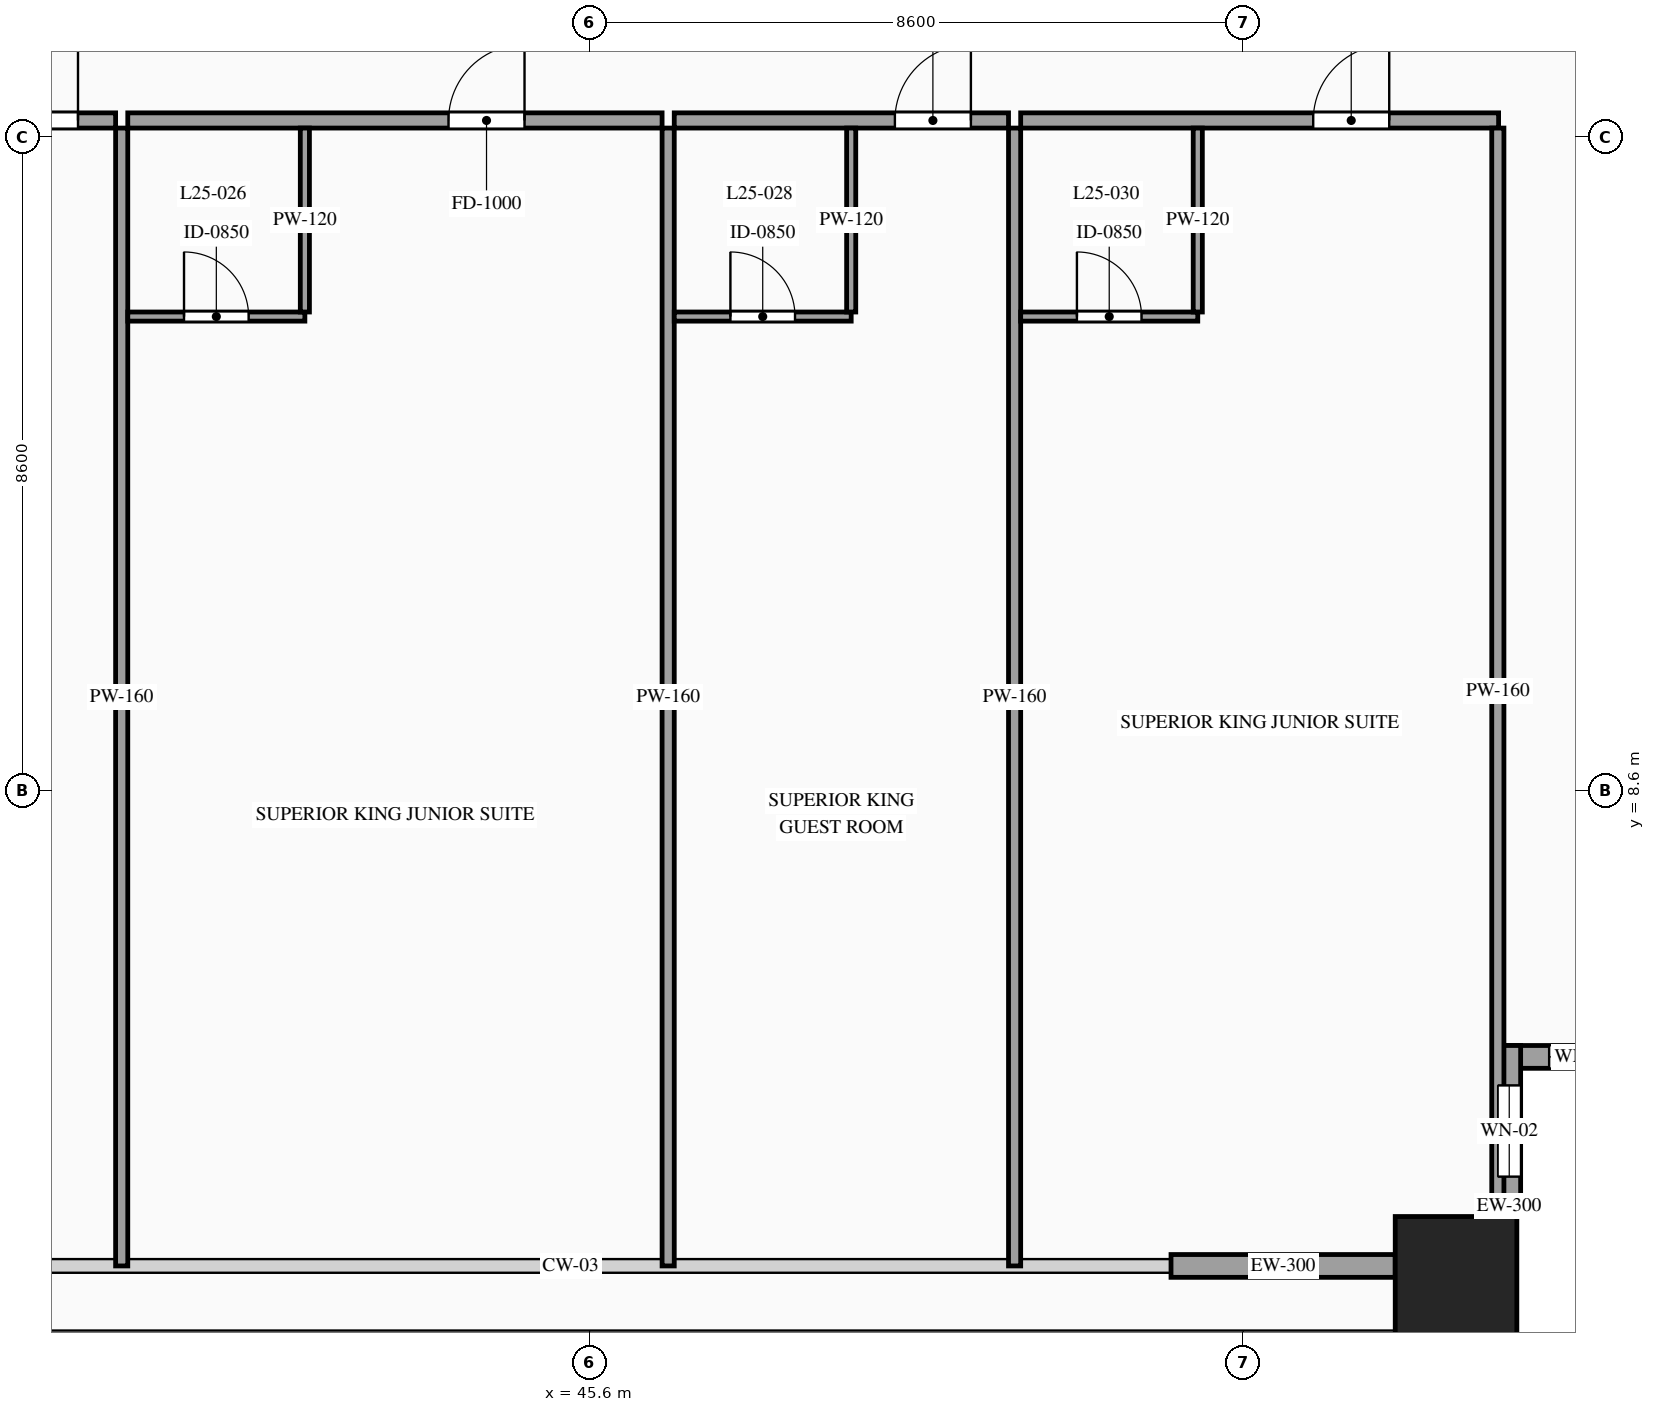
"""IFC4 building model, lengths in metres.
Left out: names, types, materials, properties, quantities, classifications, styles, units other than length and angle.
Written with IfcOpenShell. Run it as: python <this file> out.ifc"""

import sys

from ifc_helpers import new_model, si_unit, direction, frame, frame_2d, origin, origin_2d, place, context, subcontext, project, spatial, rectangle, hollow_rectangle, extrude, source, transform, mapped, element, fill, save


model = new_model("IFC4")
c1 = context("Model", 3, precision=1e-05, world=origin(), true_north=direction((0.0, 1.0)))
c2 = subcontext(c1, "Body", "Model", "MODEL_VIEW")
j1 = project(units=[si_unit("LENGTHUNIT", "METRE"), si_unit("PLANEANGLEUNIT", "RADIAN")], contexts=[c1])
p1 = place(None, origin())
s1 = spatial("IfcSite", under=j1, at=p1, CompositionType="ELEMENT")
p2 = place(p1, origin())
s2 = spatial("IfcBuilding", under=s1, at=p2, CompositionType="ELEMENT")
p3 = place(p2, frame((0.0, 0.0, 97.4)))
s3 = spatial("IfcBuildingStorey", under=s2, at=p3, CompositionType="ELEMENT", Elevation=97.4)
m1 = source(origin(), c2, "Body", "SweptSolid", [
    extrude(hollow_rectangle(XDim=1.6, YDim=1.6, WallThickness=0.07, at=origin_2d()), origin(), (0.0, 0.0, 1.0), 3.6),
])
p4 = place(p3, frame((57.0, 2.2, 0.0), z_axis=(0.0, 0.0, 1.0), x_axis=(1.0, 0.0, 0.0)))
e1 = element("IfcColumn", 1, at=p4, inside=s3, PredefinedType="COLUMN", context=c2, shape_type="MappedRepresentation", body=[
    mapped(m1, transform((0.0, 0.0, 0.0), scale=1.0)),
])
p5 = place(p3, frame((57.55, 5.1, 0.0), z_axis=(0.0, 0.0, 1.0), x_axis=(1.0, 0.0, 0.0)))
e2 = element("IfcWall", 2, at=p5, inside=s3, PredefinedType="SOLIDWALL", context=c2, shape_type="SweptSolid", body=[
    extrude(rectangle(XDim=2.25, YDim=0.3, at=frame_2d((1.125, 0.0))), origin(), (0.0, 0.0, 1.0), 3.38),
])
p6 = place(p5, frame((0.675, 0.0, 0.85)))
e3 = element("IfcOpeningElement", 3, at=p6, cuts=e2, PredefinedType="OPENING", context=c2, shape_type="SweptSolid", body=[
    extrude(rectangle(XDim=0.9, YDim=1.5, at=frame_2d((0.45, 0.75))), frame((0.0, 0.165, 0.0), z_axis=(0.0, -1.0, 0.0), x_axis=(1.0, 0.0, 0.0)), (0.0, 0.0, 1.0), 0.33),
])
p7 = place(p3, frame((57.7, 3.0, 0.0), z_axis=(0.0, 0.0, 1.0), x_axis=(0.0, 1.0, 0.0)))
e4 = element("IfcWall", 4, at=p7, inside=s3, PredefinedType="SOLIDWALL", context=c2, shape_type="SweptSolid", body=[
    extrude(rectangle(XDim=2.25, YDim=0.3, at=frame_2d((1.125, 0.0))), origin(), (0.0, 0.0, 1.0), 3.38),
])
p8 = place(p7, frame((0.525, 0.0, 0.85)))
e5 = element("IfcOpeningElement", 5, at=p8, cuts=e4, PredefinedType="OPENING", context=c2, shape_type="SweptSolid", body=[
    extrude(rectangle(XDim=1.2, YDim=2.1, at=frame_2d((0.6, 1.05))), frame((0.0, 0.165, 0.0), z_axis=(0.0, -1.0, 0.0), x_axis=(1.0, 0.0, 0.0)), (0.0, 0.0, 1.0), 0.33),
])
m2 = source(origin(), c2, "Body", "SweptSolid", [
    extrude(rectangle(XDim=2.95, YDim=0.3, at=frame_2d((1.475, 0.0))), origin(), (0.0, 0.0, 1.0), 2.775),
])
p9 = place(p3, frame((53.25, 2.35, 0.0), z_axis=(0.0, 0.0, 1.0), x_axis=(1.0, 0.0, 0.0)))
e6 = element("IfcWall", 6, at=p9, inside=s3, PredefinedType="SOLIDWALL", context=c2, shape_type="MappedRepresentation", body=[
    mapped(m2, transform((0.0, 0.0, 0.0), scale=1.0)),
])
p10 = place(p3, frame((34.965, 17.42, 0.0), z_axis=(0.0, 0.0, 1.0), x_axis=(1.0, 0.0, 0.0)))
e7 = element("IfcWall", 7, at=p10, inside=s3, PredefinedType="PARTITIONING", context=c2, shape_type="SweptSolid", body=[
    extrude(rectangle(XDim=4.399, YDim=0.2, at=frame_2d((2.199, 0.0))), origin(), (0.0, 0.0, 1.0), 3.38),
])
p11 = place(p10, frame((2.904, 0.0, 0.0)))
e8 = element("IfcOpeningElement", 8, at=p11, cuts=e7, PredefinedType="OPENING", context=c2, shape_type="SweptSolid", body=[
    extrude(rectangle(XDim=1.0, YDim=2.2, at=frame_2d((0.5, 1.1))), frame((0.0, 0.115, 0.0), z_axis=(0.0, -1.0, 0.0), x_axis=(1.0, 0.0, 0.0)), (0.0, 0.0, 1.0), 0.23),
])
m3 = source(origin(), c2, "Body", "SweptSolid", [
    extrude(rectangle(XDim=14.97, YDim=0.16, at=frame_2d((7.485, 0.0))), origin(), (0.0, 0.0, 1.0), 3.38),
])
p12 = place(p3, frame((39.444, 2.35, 0.0), z_axis=(0.0, 0.0, 1.0), x_axis=(0.0, 1.0, 0.0)))
e9 = element("IfcWall", 9, at=p12, inside=s3, PredefinedType="PARTITIONING", context=c2, shape_type="MappedRepresentation", body=[
    mapped(m3, transform((0.0, 0.0, 0.0), scale=1.0)),
])
p13 = place(p3, frame((39.524, 17.42, 0.0), z_axis=(0.0, 0.0, 1.0), x_axis=(1.0, 0.0, 0.0)))
e10 = element("IfcWall", 10, at=p13, inside=s3, PredefinedType="PARTITIONING", context=c2, shape_type="SweptSolid", body=[
    extrude(rectangle(XDim=7.03, YDim=0.2, at=frame_2d((3.515, 0.0))), origin(), (0.0, 0.0, 1.0), 3.38),
])
p14 = place(p13, frame((4.22, 0.0, 0.0)))
e11 = element("IfcOpeningElement", 11, at=p14, cuts=e10, PredefinedType="OPENING", context=c2, shape_type="SweptSolid", body=[
    extrude(rectangle(XDim=1.0, YDim=2.2, at=frame_2d((0.5, 1.1))), frame((0.0, 0.115, 0.0), z_axis=(0.0, -1.0, 0.0), x_axis=(1.0, 0.0, 0.0)), (0.0, 0.0, 1.0), 0.23),
])
p15 = place(p3, frame((46.634, 2.35, 0.0), z_axis=(0.0, 0.0, 1.0), x_axis=(0.0, 1.0, 0.0)))
e12 = element("IfcWall", 12, at=p15, inside=s3, PredefinedType="PARTITIONING", context=c2, shape_type="MappedRepresentation", body=[
    mapped(m3, transform((0.0, 0.0, 0.0), scale=1.0)),
])
p16 = place(p3, frame((39.524, 14.84, 0.0), z_axis=(0.0, 0.0, 1.0), x_axis=(1.0, 0.0, 0.0)))
e13 = element("IfcWall", 13, at=p16, inside=s3, PredefinedType="PARTITIONING", context=c2, shape_type="SweptSolid", body=[
    extrude(rectangle(XDim=2.33, YDim=0.12, at=frame_2d((1.165, 0.0))), origin(), (0.0, 0.0, 1.0), 3.38),
])
p17 = place(p16, frame((0.74, 0.0, 0.0)))
e14 = element("IfcOpeningElement", 14, at=p17, cuts=e13, PredefinedType="OPENING", context=c2, shape_type="SweptSolid", body=[
    extrude(rectangle(XDim=0.85, YDim=2.1, at=frame_2d((0.425, 1.05))), frame((0.0, 0.075, 0.0), z_axis=(0.0, -1.0, 0.0), x_axis=(1.0, 0.0, 0.0)), (0.0, 0.0, 1.0), 0.15),
])
m4 = source(origin(), c2, "Body", "SweptSolid", [
    extrude(rectangle(XDim=2.42, YDim=0.12, at=frame_2d((1.21, 0.0))), origin(), (0.0, 0.0, 1.0), 3.38),
])
p18 = place(p3, frame((41.854, 14.9, 0.0), z_axis=(0.0, 0.0, 1.0), x_axis=(0.0, 1.0, 0.0)))
e15 = element("IfcWall", 15, at=p18, inside=s3, PredefinedType="PARTITIONING", context=c2, shape_type="MappedRepresentation", body=[
    mapped(m4, transform((0.0, 0.0, 0.0), scale=1.0)),
])
p19 = place(p3, frame((46.714, 17.42, 0.0), z_axis=(0.0, 0.0, 1.0), x_axis=(1.0, 0.0, 0.0)))
e16 = element("IfcWall", 16, at=p19, inside=s3, PredefinedType="PARTITIONING", context=c2, shape_type="SweptSolid", body=[
    extrude(rectangle(XDim=4.398, YDim=0.2, at=frame_2d((2.199, 0.0))), origin(), (0.0, 0.0, 1.0), 3.38),
])
p20 = place(p19, frame((2.903, 0.0, 0.0)))
e17 = element("IfcOpeningElement", 17, at=p20, cuts=e16, PredefinedType="OPENING", context=c2, shape_type="SweptSolid", body=[
    extrude(rectangle(XDim=1.0, YDim=2.2, at=frame_2d((0.5, 1.1))), frame((0.0, 0.115, 0.0), z_axis=(0.0, -1.0, 0.0), x_axis=(1.0, 0.0, 0.0)), (0.0, 0.0, 1.0), 0.23),
])
p21 = place(p3, frame((51.192, 2.35, 0.0), z_axis=(0.0, 0.0, 1.0), x_axis=(0.0, 1.0, 0.0)))
e18 = element("IfcWall", 18, at=p21, inside=s3, PredefinedType="PARTITIONING", context=c2, shape_type="MappedRepresentation", body=[
    mapped(m3, transform((0.0, 0.0, 0.0), scale=1.0)),
])
p22 = place(p3, frame((46.714, 14.84, 0.0), z_axis=(0.0, 0.0, 1.0), x_axis=(1.0, 0.0, 0.0)))
e19 = element("IfcWall", 19, at=p22, inside=s3, PredefinedType="PARTITIONING", context=c2, shape_type="SweptSolid", body=[
    extrude(rectangle(XDim=2.328, YDim=0.12, at=frame_2d((1.164, 0.0))), origin(), (0.0, 0.0, 1.0), 3.38),
])
p23 = place(p22, frame((0.739, 0.0, 0.0)))
e20 = element("IfcOpeningElement", 20, at=p23, cuts=e19, PredefinedType="OPENING", context=c2, shape_type="SweptSolid", body=[
    extrude(rectangle(XDim=0.85, YDim=2.1, at=frame_2d((0.425, 1.05))), frame((0.0, 0.075, 0.0), z_axis=(0.0, -1.0, 0.0), x_axis=(1.0, 0.0, 0.0)), (0.0, 0.0, 1.0), 0.15),
])
p24 = place(p3, frame((49.042, 14.9, 0.0), z_axis=(0.0, 0.0, 1.0), x_axis=(0.0, 1.0, 0.0)))
e21 = element("IfcWall", 21, at=p24, inside=s3, PredefinedType="PARTITIONING", context=c2, shape_type="MappedRepresentation", body=[
    mapped(m4, transform((0.0, 0.0, 0.0), scale=1.0)),
])
p25 = place(p3, frame((51.272, 17.42, 0.0), z_axis=(0.0, 0.0, 1.0), x_axis=(1.0, 0.0, 0.0)))
e22 = element("IfcWall", 22, at=p25, inside=s3, PredefinedType="PARTITIONING", context=c2, shape_type="SweptSolid", body=[
    extrude(rectangle(XDim=6.288, YDim=0.2, at=frame_2d((3.144, 0.0))), origin(), (0.0, 0.0, 1.0), 3.38),
])
p26 = place(p25, frame((3.849, 0.0, 0.0)))
e23 = element("IfcOpeningElement", 23, at=p26, cuts=e22, PredefinedType="OPENING", context=c2, shape_type="SweptSolid", body=[
    extrude(rectangle(XDim=1.0, YDim=2.2, at=frame_2d((0.5, 1.1))), frame((0.0, 0.115, 0.0), z_axis=(0.0, -1.0, 0.0), x_axis=(1.0, 0.0, 0.0)), (0.0, 0.0, 1.0), 0.23),
])
m5 = source(origin(), c2, "Body", "SweptSolid", [
    extrude(rectangle(XDim=14.82, YDim=0.16, at=frame_2d((7.41, 0.0))), origin(), (0.0, 0.0, 1.0), 3.38),
])
p27 = place(p3, frame((57.55, 2.5, 0.0), z_axis=(0.0, 0.0, 1.0), x_axis=(0.0, 1.0, 0.0)))
e24 = element("IfcWall", 24, at=p27, inside=s3, PredefinedType="PARTITIONING", context=c2, shape_type="MappedRepresentation", body=[
    mapped(m5, transform((0.0, 0.0, 0.0), scale=1.0)),
])
p28 = place(p3, frame((51.272, 14.84, 0.0), z_axis=(0.0, 0.0, 1.0), x_axis=(1.0, 0.0, 0.0)))
e25 = element("IfcWall", 25, at=p28, inside=s3, PredefinedType="PARTITIONING", context=c2, shape_type="SweptSolid", body=[
    extrude(rectangle(XDim=2.33, YDim=0.12, at=frame_2d((1.165, 0.0))), origin(), (0.0, 0.0, 1.0), 3.38),
])
p29 = place(p28, frame((0.74, 0.0, 0.0)))
e26 = element("IfcOpeningElement", 26, at=p29, cuts=e25, PredefinedType="OPENING", context=c2, shape_type="SweptSolid", body=[
    extrude(rectangle(XDim=0.85, YDim=2.1, at=frame_2d((0.425, 1.05))), frame((0.0, 0.075, 0.0), z_axis=(0.0, -1.0, 0.0), x_axis=(1.0, 0.0, 0.0)), (0.0, 0.0, 1.0), 0.15),
])
p30 = place(p3, frame((53.602, 14.9, 0.0), z_axis=(0.0, 0.0, 1.0), x_axis=(0.0, 1.0, 0.0)))
e27 = element("IfcWall", 27, at=p30, inside=s3, PredefinedType="PARTITIONING", context=c2, shape_type="MappedRepresentation", body=[
    mapped(m4, transform((0.0, 0.0, 0.0), scale=1.0)),
])
m6 = source(origin(), c2, "Body", "SweptSolid", [
    extrude(rectangle(XDim=0.9, YDim=1.5, at=frame_2d((0.45, 0.75))), frame((0.0, 0.03, 0.0), z_axis=(0.0, -1.0, 0.0), x_axis=(1.0, 0.0, 0.0)), (0.0, 0.0, 1.0), 0.06),
])
p31 = place(p6, origin())
e28 = element("IfcWindow", 28, at=p31, inside=s3, PartitioningType="SINGLE_PANEL", PredefinedType="WINDOW", context=c2, shape_type="MappedRepresentation", body=[
    mapped(m6, transform((0.0, 0.0, 0.0), scale=1.0)),
])
fill(e3, e28)
m7 = source(origin(), c2, "Body", "SweptSolid", [
    extrude(rectangle(XDim=1.2, YDim=2.1, at=frame_2d((0.6, 1.05))), frame((0.0, 0.03, 0.0), z_axis=(0.0, -1.0, 0.0), x_axis=(1.0, 0.0, 0.0)), (0.0, 0.0, 1.0), 0.06),
])
p32 = place(p8, origin())
e29 = element("IfcWindow", 29, at=p32, inside=s3, PartitioningType="SINGLE_PANEL", PredefinedType="WINDOW", context=c2, shape_type="MappedRepresentation", body=[
    mapped(m7, transform((0.0, 0.0, 0.0), scale=1.0)),
])
fill(e5, e29)
m8 = source(origin(), c2, "Body", "SweptSolid", [
    extrude(rectangle(XDim=1.0, YDim=2.2, at=frame_2d((0.5, 1.1))), frame((0.0, 0.025, 0.0), z_axis=(0.0, -1.0, 0.0), x_axis=(1.0, 0.0, 0.0)), (0.0, 0.0, 1.0), 0.05),
])
p33 = place(p11, origin())
e30 = element("IfcDoor", 30, at=p33, inside=s3, OperationType="SINGLE_SWING_RIGHT", PredefinedType="DOOR", context=c2, shape_type="MappedRepresentation", body=[
    mapped(m8, transform((0.0, 0.0, 0.0), scale=1.0)),
])
fill(e8, e30)
p34 = place(p14, origin())
e31 = element("IfcDoor", 31, at=p34, inside=s3, OperationType="SINGLE_SWING_RIGHT", PredefinedType="DOOR", context=c2, shape_type="MappedRepresentation", body=[
    mapped(m8, transform((0.0, 0.0, 0.0), scale=1.0)),
])
fill(e11, e31)
m9 = source(origin(), c2, "Body", "SweptSolid", [
    extrude(rectangle(XDim=0.85, YDim=2.1, at=frame_2d((0.425, 1.05))), frame((0.0, 0.025, 0.0), z_axis=(0.0, -1.0, 0.0), x_axis=(1.0, 0.0, 0.0)), (0.0, 0.0, 1.0), 0.05),
])
p35 = place(p17, origin())
e32 = element("IfcDoor", 32, at=p35, inside=s3, OperationType="SINGLE_SWING_LEFT", PredefinedType="DOOR", context=c2, shape_type="MappedRepresentation", body=[
    mapped(m9, transform((0.0, 0.0, 0.0), scale=1.0)),
])
fill(e14, e32)
p36 = place(p20, origin())
e33 = element("IfcDoor", 33, at=p36, inside=s3, OperationType="SINGLE_SWING_RIGHT", PredefinedType="DOOR", context=c2, shape_type="MappedRepresentation", body=[
    mapped(m8, transform((0.0, 0.0, 0.0), scale=1.0)),
])
fill(e17, e33)
p37 = place(p23, origin())
e34 = element("IfcDoor", 34, at=p37, inside=s3, OperationType="SINGLE_SWING_LEFT", PredefinedType="DOOR", context=c2, shape_type="MappedRepresentation", body=[
    mapped(m9, transform((0.0, 0.0, 0.0), scale=1.0)),
])
fill(e20, e34)
p38 = place(p26, origin())
e35 = element("IfcDoor", 35, at=p38, inside=s3, OperationType="SINGLE_SWING_RIGHT", PredefinedType="DOOR", context=c2, shape_type="MappedRepresentation", body=[
    mapped(m8, transform((0.0, 0.0, 0.0), scale=1.0)),
])
fill(e23, e35)
p39 = place(p29, origin())
e36 = element("IfcDoor", 36, at=p39, inside=s3, OperationType="SINGLE_SWING_LEFT", PredefinedType="DOOR", context=c2, shape_type="MappedRepresentation", body=[
    mapped(m9, transform((0.0, 0.0, 0.0), scale=1.0)),
])
fill(e26, e36)
save(model, sys.argv[1])
